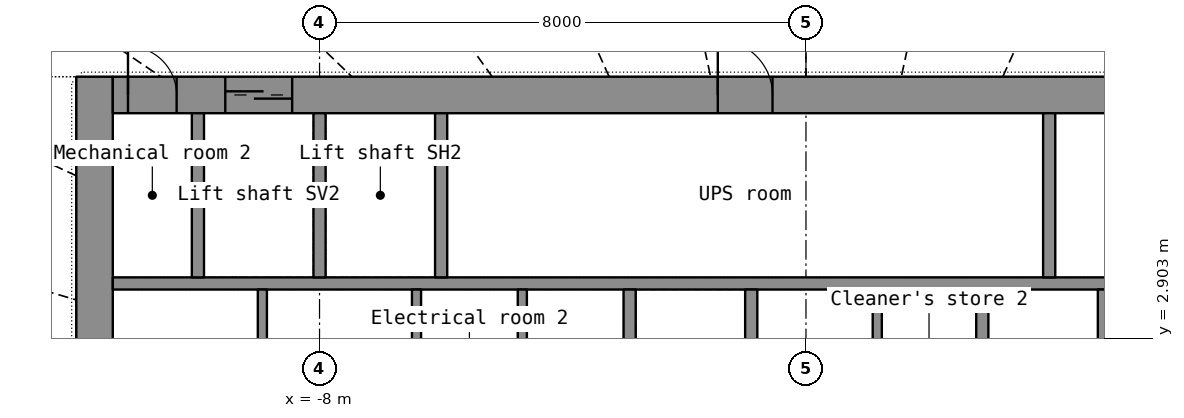
"""IFC4 building model, lengths in metres.
Left out: names, types, materials, properties, quantities, classifications, styles, units other than length and angle.
Written with IfcOpenShell. Run it as: python <this file> out.ifc"""

import sys

from ifc_helpers import new_model, si_unit, direction, frame, frame_2d, origin, place, context, subcontext, project, spatial, rectangle, extrude, element, fill, save


model = new_model("IFC4")
c1 = context("Model", 3, precision=1e-05, world=origin(), true_north=direction((0.0, 1.0)))
c2 = subcontext(c1, "Body", "Model", "MODEL_VIEW")
j1 = project(units=[si_unit("LENGTHUNIT", "METRE"), si_unit("PLANEANGLEUNIT", "RADIAN")], contexts=[c1])
p1 = place(None, origin())
s1 = spatial("IfcSite", under=j1, at=p1, CompositionType="ELEMENT")
p2 = place(p1, origin())
s2 = spatial("IfcBuilding", under=s1, at=p2, CompositionType="ELEMENT")
p3 = place(p2, frame((0.0, 0.0, 20.0)))
s3 = spatial("IfcBuildingStorey", under=s2, at=p3, CompositionType="ELEMENT", Elevation=20.0)
p4 = place(p3, frame((-11.7, -7.2, 0.0), z_axis=(0.0, 0.0, 1.0), x_axis=(0.0, 1.0, 0.0)))
e1 = element("IfcWall", 1, at=p4, inside=s3, PredefinedType="SHEAR", context=c2, shape_type="SweptSolid", body=[
    extrude(rectangle(XDim=14.4, YDim=0.6, at=frame_2d((7.2, 0.0))), origin(), (0.0, 0.0, 1.0), 4.1),
])
p5 = place(p4, frame((6.5, 0.0, 0.0)))
e2 = element("IfcOpeningElement", 2, at=p5, cuts=e1, PredefinedType="OPENING", context=c2, shape_type="SweptSolid", body=[
    extrude(rectangle(XDim=1.4, YDim=2.2, at=frame_2d((0.7, 1.1))), frame((0.0, 0.31, 0.0), z_axis=(0.0, -1.0, 0.0), x_axis=(1.0, 0.0, 0.0)), (0.0, 0.0, 1.0), 0.62),
])
p6 = place(p3, frame((-11.4, 6.9, 0.0), z_axis=(0.0, 0.0, 1.0), x_axis=(1.0, 0.0, 0.0)))
e3 = element("IfcWall", 3, at=p6, inside=s3, PredefinedType="SHEAR", context=c2, shape_type="SweptSolid", body=[
    extrude(rectangle(XDim=22.8, YDim=0.6, at=frame_2d((11.4, 0.0))), origin(), (0.0, 0.0, 1.0), 4.1),
])
p7 = place(p6, frame((1.85, 0.0, 0.0)))
e4 = element("IfcOpeningElement", 4, at=p7, cuts=e3, PredefinedType="OPENING", context=c2, shape_type="SweptSolid", body=[
    extrude(rectangle(XDim=1.1, YDim=2.2, at=frame_2d((0.55, 1.1))), frame((0.0, 0.31, 0.0), z_axis=(0.0, -1.0, 0.0), x_axis=(1.0, 0.0, 0.0)), (0.0, 0.0, 1.0), 0.62),
])
p8 = place(p6, frame((9.95, 0.0, 0.0)))
e5 = element("IfcOpeningElement", 5, at=p8, cuts=e3, PredefinedType="OPENING", context=c2, shape_type="SweptSolid", body=[
    extrude(rectangle(XDim=0.9, YDim=2.1, at=frame_2d((0.45, 1.05))), frame((0.0, 0.31, 0.0), z_axis=(0.0, -1.0, 0.0), x_axis=(1.0, 0.0, 0.0)), (0.0, 0.0, 1.0), 0.62),
])
p9 = place(p6, frame((17.95, 0.0, 0.0)))
e6 = element("IfcOpeningElement", 6, at=p9, cuts=e3, PredefinedType="OPENING", context=c2, shape_type="SweptSolid", body=[
    extrude(rectangle(XDim=0.9, YDim=2.1, at=frame_2d((0.45, 1.05))), frame((0.0, 0.31, 0.0), z_axis=(0.0, -1.0, 0.0), x_axis=(1.0, 0.0, 0.0)), (0.0, 0.0, 1.0), 0.62),
])
p10 = place(p6, frame((0.25, 0.0, 0.0)))
e7 = element("IfcOpeningElement", 7, at=p10, cuts=e3, PredefinedType="OPENING", context=c2, shape_type="SweptSolid", body=[
    extrude(rectangle(XDim=0.8, YDim=2.05, at=frame_2d((0.4, 1.025))), frame((0.0, 0.31, 0.0), z_axis=(0.0, -1.0, 0.0), x_axis=(1.0, 0.0, 0.0)), (0.0, 0.0, 1.0), 0.62),
])
p11 = place(p6, frame((21.75, 0.0, 0.0)))
e8 = element("IfcOpeningElement", 8, at=p11, cuts=e3, PredefinedType="OPENING", context=c2, shape_type="SweptSolid", body=[
    extrude(rectangle(XDim=0.8, YDim=2.05, at=frame_2d((0.4, 1.025))), frame((0.0, 0.31, 0.0), z_axis=(0.0, -1.0, 0.0), x_axis=(1.0, 0.0, 0.0)), (0.0, 0.0, 1.0), 0.62),
])
p12 = place(p3, frame((-11.4, 3.8, 0.0), z_axis=(0.0, 0.0, 1.0), x_axis=(1.0, 0.0, 0.0)))
e9 = element("IfcWall", 9, at=p12, inside=s3, PredefinedType="SHEAR", context=c2, shape_type="SweptSolid", body=[
    extrude(rectangle(XDim=22.8, YDim=0.2, at=frame_2d((11.4, 0.0))), origin(), (0.0, 0.0, 1.0), 4.1),
])
for number, where, z_axis, x_axis in (
    (10, (-10.0, 3.9, 0.0), (0.0, 0.0, 1.0), (0.0, 1.0, 0.0)),
    (11, (-8.0, 3.9, 0.0), (0.0, 0.0, 1.0), (0.0, 1.0, 0.0)),
    (12, (-6.0, 3.9, 0.0), (0.0, 0.0, 1.0), (0.0, 1.0, 0.0)),
):
    element("IfcWall", number, at=place(p3, frame(where, z_axis=z_axis, x_axis=x_axis)), inside=s3, PredefinedType="SHEAR", context=c2, shape_type="SweptSolid", body=[
        extrude(rectangle(XDim=2.7, YDim=0.2, at=frame_2d((1.35, 0.0))), origin(), (0.0, 0.0, 1.0), 4.1),
    ])
p13 = place(p3, frame((4.0, 3.9, 0.0), z_axis=(0.0, 0.0, 1.0), x_axis=(0.0, 1.0, 0.0)))
e13 = element("IfcWall", 13, at=p13, inside=s3, PredefinedType="PARTITIONING", context=c2, shape_type="SweptSolid", body=[
    extrude(rectangle(XDim=2.7, YDim=0.2, at=frame_2d((1.35, 0.0))), origin(), (0.0, 0.0, 1.0), 4.1),
])
p14 = place(p3, frame((-2.9, -3.7, 0.0), z_axis=(0.0, 0.0, 1.0), x_axis=(0.0, 1.0, 0.0)))
e14 = element("IfcWall", 14, at=p14, inside=s3, PredefinedType="SHEAR", context=c2, shape_type="SweptSolid", body=[
    extrude(rectangle(XDim=7.4, YDim=0.2, at=frame_2d((3.7, 0.0))), origin(), (0.0, 0.0, 1.0), 4.1),
])
p15 = place(p14, frame((3.1, 0.0, 0.0)))
e15 = element("IfcOpeningElement", 15, at=p15, cuts=e14, PredefinedType="OPENING", context=c2, shape_type="SweptSolid", body=[
    extrude(rectangle(XDim=1.2, YDim=2.2, at=frame_2d((0.6, 1.1))), frame((0.0, 0.11, 0.0), z_axis=(0.0, -1.0, 0.0), x_axis=(1.0, 0.0, 0.0)), (0.0, 0.0, 1.0), 0.22),
])
p16 = place(p3, frame((2.9, -3.7, 0.0), z_axis=(0.0, 0.0, 1.0), x_axis=(0.0, 1.0, 0.0)))
e16 = element("IfcWall", 16, at=p16, inside=s3, PredefinedType="SHEAR", context=c2, shape_type="SweptSolid", body=[
    extrude(rectangle(XDim=7.4, YDim=0.2, at=frame_2d((3.7, 0.0))), origin(), (0.0, 0.0, 1.0), 4.1),
])
p17 = place(p16, frame((3.1, 0.0, 0.0)))
e17 = element("IfcOpeningElement", 17, at=p17, cuts=e16, PredefinedType="OPENING", context=c2, shape_type="SweptSolid", body=[
    extrude(rectangle(XDim=1.2, YDim=2.2, at=frame_2d((0.6, 1.1))), frame((0.0, 0.11, 0.0), z_axis=(0.0, -1.0, 0.0), x_axis=(1.0, 0.0, 0.0)), (0.0, 0.0, 1.0), 0.22),
])
for number, where, z_axis, x_axis in (
    (18, (-0.9, 1.35, 0.0), (0.0, 0.0, 1.0), (0.0, 1.0, 0.0)),
    (19, (4.9, 1.35, 0.0), (0.0, 0.0, 1.0), (0.0, 1.0, 0.0)),
):
    element("IfcWall", number, at=place(p3, frame(where, z_axis=z_axis, x_axis=x_axis)), inside=s3, PredefinedType="SHEAR", context=c2, shape_type="SweptSolid", body=[
        extrude(rectangle(XDim=2.35, YDim=0.2, at=frame_2d((1.175, 0.0))), origin(), (0.0, 0.0, 1.0), 4.1),
    ])
for number, where, z_axis, x_axis in (
    (20, (-8.94, 1.35, 0.0), (0.0, 0.0, 1.0), (0.0, 1.0, 0.0)),
    (21, (-6.405, 1.35, 0.0), (0.0, 0.0, 1.0), (0.0, 1.0, 0.0)),
    (22, (-4.665, 1.35, 0.0), (0.0, 0.0, 1.0), (0.0, 1.0, 0.0)),
    (23, (1.173, 1.35, 0.0), (0.0, 0.0, 1.0), (0.0, 1.0, 0.0)),
):
    element("IfcWall", number, at=place(p3, frame(where, z_axis=z_axis, x_axis=x_axis)), inside=s3, PredefinedType="PARTITIONING", context=c2, shape_type="SweptSolid", body=[
        extrude(rectangle(XDim=2.35, YDim=0.15, at=frame_2d((1.175, 0.0))), origin(), (0.0, 0.0, 1.0), 4.1),
    ])
p18 = place(p7, origin())
e24 = element("IfcDoor", 24, at=p18, inside=s3, OperationType="DOUBLE_DOOR_SLIDING", PredefinedType="DOOR", context=c2, shape_type="SweptSolid", body=[
    extrude(rectangle(XDim=1.1, YDim=2.2, at=frame_2d((0.55, 1.1))), frame((0.0, 0.025, 0.0), z_axis=(0.0, -1.0, 0.0), x_axis=(1.0, 0.0, 0.0)), (0.0, 0.0, 1.0), 0.05),
])
fill(e4, e24)
p19 = place(p8, origin())
e25 = element("IfcDoor", 25, at=p19, inside=s3, OperationType="SINGLE_SWING_LEFT", PredefinedType="DOOR", context=c2, shape_type="SweptSolid", body=[
    extrude(rectangle(XDim=0.9, YDim=2.1, at=frame_2d((0.45, 1.05))), frame((0.0, 0.025, 0.0), z_axis=(0.0, -1.0, 0.0), x_axis=(1.0, 0.0, 0.0)), (0.0, 0.0, 1.0), 0.05),
])
fill(e5, e25)
p20 = place(p10, origin())
e26 = element("IfcDoor", 26, at=p20, inside=s3, OperationType="SINGLE_SWING_LEFT", PredefinedType="DOOR", context=c2, shape_type="SweptSolid", body=[
    extrude(rectangle(XDim=0.8, YDim=2.05, at=frame_2d((0.4, 1.025))), frame((0.0, 0.025, 0.0), z_axis=(0.0, -1.0, 0.0), x_axis=(1.0, 0.0, 0.0)), (0.0, 0.0, 1.0), 0.05),
])
fill(e7, e26)
save(model, sys.argv[1])
